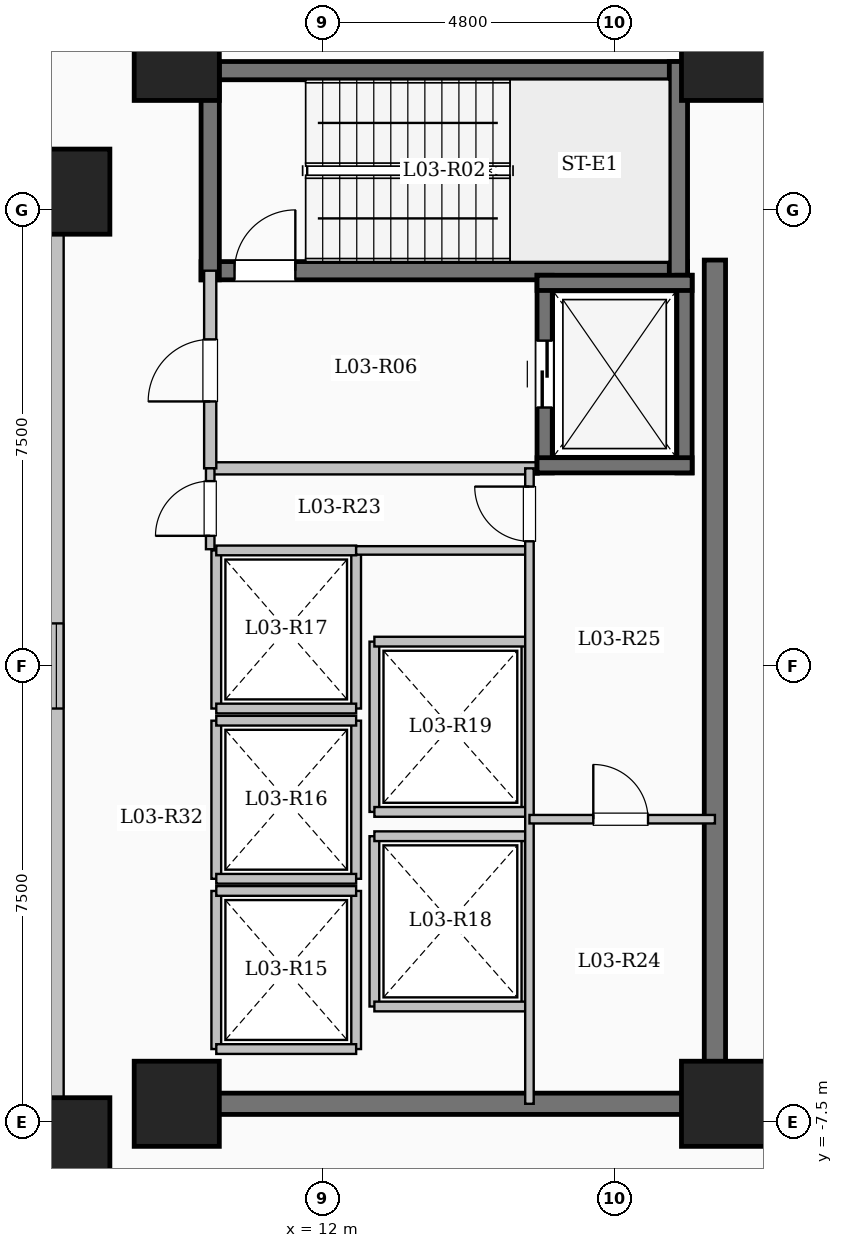
"""IFC4 building model, lengths in metres.
Left out: names, types, materials, properties, quantities, classifications, styles, units other than length and angle.
Written with IfcOpenShell. Run it as: python <this file> out.ifc"""

import sys

from ifc_helpers import new_model, si_unit, direction, frame, frame_2d, origin, origin_2d, place, context, subcontext, project, spatial, rectangle, extrude, element, fill, save


model = new_model("IFC4")
c1 = context("Model", 3, precision=1e-05, world=origin(), true_north=direction((0.0, 1.0)))
c2 = subcontext(c1, "Body", "Model", "MODEL_VIEW")
j1 = project(units=[si_unit("LENGTHUNIT", "METRE"), si_unit("PLANEANGLEUNIT", "RADIAN")], contexts=[c1])
p1 = place(None, origin())
s1 = spatial("IfcSite", under=j1, at=p1, CompositionType="ELEMENT")
p2 = place(p1, origin())
s2 = spatial("IfcBuilding", under=s1, at=p2, CompositionType="ELEMENT")
p3 = place(p2, frame((0.0, 0.0, 14.4)))
s3 = spatial("IfcBuildingStorey", under=s2, at=p3, CompositionType="ELEMENT", Elevation=14.4)
for number, where, z_axis, x_axis in (
    (1, (7.8, -7.8, 0.0), (0.0, 0.0, 1.0), (1.0, 0.0, 0.0)),
    (2, (7.8, 7.8, 0.0), (0.0, 0.0, 1.0), (1.0, 0.0, 0.0)),
    (3, (9.6, -7.2, 0.0), (0.0, 0.0, 1.0), (1.0, 0.0, 0.0)),
    (4, (9.6, 10.0, 0.0), (0.0, 0.0, 1.0), (1.0, 0.0, 0.0)),
    (5, (18.6, -7.2, 0.0), (0.0, 0.0, 1.0), (1.0, 0.0, 0.0)),
    (6, (18.6, 10.0, 0.0), (0.0, 0.0, 1.0), (1.0, 0.0, 0.0)),
):
    element("IfcColumn", number, at=place(p3, frame(where, z_axis=z_axis, x_axis=x_axis)), inside=s3, PredefinedType="COLUMN", context=c2, shape_type="SweptSolid", body=[
        extrude(rectangle(XDim=1.4, YDim=1.4, at=origin_2d()), origin(), (0.0, 0.0, 1.0), 4.5),
    ])
p4 = place(p3, frame((-7.62, -7.62, 0.0), z_axis=(0.0, 0.0, 1.0), x_axis=(1.0, 0.0, 0.0)))
e7 = element("IfcWall", 7, at=p4, inside=s3, PredefinedType="SOLIDWALL", context=c2, shape_type="SweptSolid", body=[
    extrude(rectangle(XDim=15.24, YDim=0.24, at=frame_2d((7.62, 0.0))), origin(), (0.0, 0.0, 1.0), 4.2),
])
p5 = place(p4, frame((6.92, 0.0, 0.95)))
e8 = element("IfcOpeningElement", 8, at=p5, cuts=e7, PredefinedType="OPENING", context=c2, shape_type="SweptSolid", body=[
    extrude(rectangle(XDim=1.4, YDim=1.5, at=frame_2d((0.7, 0.75))), frame((0.0, 0.13, 0.0), z_axis=(0.0, -1.0, 0.0), x_axis=(1.0, 0.0, 0.0)), (0.0, 0.0, 1.0), 0.26),
])
p6 = place(p3, frame((7.62, -7.62, 0.0), z_axis=(0.0, 0.0, 1.0), x_axis=(0.0, 1.0, 0.0)))
e9 = element("IfcWall", 9, at=p6, inside=s3, PredefinedType="SOLIDWALL", context=c2, shape_type="SweptSolid", body=[
    extrude(rectangle(XDim=15.24, YDim=0.24, at=frame_2d((7.62, 0.0))), origin(), (0.0, 0.0, 1.0), 4.2),
])
p7 = place(p6, frame((6.92, 0.0, 0.95)))
e10 = element("IfcOpeningElement", 10, at=p7, cuts=e9, PredefinedType="OPENING", context=c2, shape_type="SweptSolid", body=[
    extrude(rectangle(XDim=1.4, YDim=1.5, at=frame_2d((0.7, 0.75))), frame((0.0, 0.13, 0.0), z_axis=(0.0, -1.0, 0.0), x_axis=(1.0, 0.0, 0.0)), (0.0, 0.0, 1.0), 0.26),
])
p8 = place(p3, frame((7.62, 7.62, 0.0), z_axis=(0.0, 0.0, 1.0), x_axis=(-1.0, 0.0, 0.0)))
e11 = element("IfcWall", 11, at=p8, inside=s3, PredefinedType="SOLIDWALL", context=c2, shape_type="SweptSolid", body=[
    extrude(rectangle(XDim=15.24, YDim=0.24, at=frame_2d((7.62, 0.0))), origin(), (0.0, 0.0, 1.0), 4.2),
])
p9 = place(p8, frame((6.92, 0.0, 0.95)))
e12 = element("IfcOpeningElement", 12, at=p9, cuts=e11, PredefinedType="OPENING", context=c2, shape_type="SweptSolid", body=[
    extrude(rectangle(XDim=1.4, YDim=1.5, at=frame_2d((0.7, 0.75))), frame((0.0, 0.13, 0.0), z_axis=(0.0, -1.0, 0.0), x_axis=(1.0, 0.0, 0.0)), (0.0, 0.0, 1.0), 0.26),
])
p10 = place(p3, frame((10.0, 9.79, 0.0), z_axis=(0.0, 0.0, 1.0), x_axis=(1.0, 0.0, 0.0)))
e13 = element("IfcWall", 13, at=p10, inside=s3, PredefinedType="SHEAR", context=c2, shape_type="SweptSolid", body=[
    extrude(rectangle(XDim=8.0, YDim=0.3, at=frame_2d((4.0, 0.0))), origin(), (0.0, 0.0, 1.0), 4.5),
])
p11 = place(p3, frame((10.0, 6.5, 0.0), z_axis=(0.0, 0.0, 1.0), x_axis=(1.0, 0.0, 0.0)))
e14 = element("IfcWall", 14, at=p11, inside=s3, PredefinedType="SHEAR", context=c2, shape_type="SweptSolid", body=[
    extrude(rectangle(XDim=8.0, YDim=0.3, at=frame_2d((4.0, 0.0))), origin(), (0.0, 0.0, 1.0), 4.5),
])
p12 = place(p11, frame((0.55, 0.0, 0.0)))
e15 = element("IfcOpeningElement", 15, at=p12, cuts=e14, PredefinedType="OPENING", context=c2, shape_type="SweptSolid", body=[
    extrude(rectangle(XDim=1.0, YDim=2.15, at=frame_2d((0.5, 1.075))), frame((0.0, 0.16, 0.0), z_axis=(0.0, -1.0, 0.0), x_axis=(1.0, 0.0, 0.0)), (0.0, 0.0, 1.0), 0.32),
])
for number, where, z_axis, x_axis in (
    (16, (10.15, 6.35, 0.0), (0.0, 0.0, 1.0), (0.0, 1.0, 0.0)),
    (17, (17.85, 6.35, 0.0), (0.0, 0.0, 1.0), (0.0, 1.0, 0.0)),
):
    element("IfcWall", number, at=place(p3, frame(where, z_axis=z_axis, x_axis=x_axis)), inside=s3, PredefinedType="SHEAR", context=c2, shape_type="SweptSolid", body=[
        extrude(rectangle(XDim=3.59, YDim=0.3, at=frame_2d((1.795, 0.0))), origin(), (0.0, 0.0, 1.0), 4.5),
    ])
p13 = place(p3, frame((10.15, 3.25, 0.0), z_axis=(0.0, 0.0, 1.0), x_axis=(1.0, 0.0, 0.0)))
e18 = element("IfcWall", 18, at=p13, inside=s3, PredefinedType="SOLIDWALL", context=c2, shape_type="SweptSolid", body=[
    extrude(rectangle(XDim=5.4, YDim=0.2, at=frame_2d((2.7, 0.0))), origin(), (0.0, 0.0, 1.0), 4.2),
])
p14 = place(p3, frame((10.15, 3.25, 0.0), z_axis=(0.0, 0.0, 1.0), x_axis=(0.0, 1.0, 0.0)))
e19 = element("IfcWall", 19, at=p14, inside=s3, PredefinedType="SOLIDWALL", context=c2, shape_type="SweptSolid", body=[
    extrude(rectangle(XDim=3.25, YDim=0.2, at=frame_2d((1.625, 0.0))), origin(), (0.0, 0.0, 1.0), 4.2),
])
p15 = place(p14, frame((1.1, 0.0, 0.0)))
e20 = element("IfcOpeningElement", 20, at=p15, cuts=e19, PredefinedType="OPENING", context=c2, shape_type="SweptSolid", body=[
    extrude(rectangle(XDim=1.02, YDim=2.15, at=frame_2d((0.51, 1.075))), frame((0.0, 0.11, 0.0), z_axis=(0.0, -1.0, 0.0), x_axis=(1.0, 0.0, 0.0)), (0.0, 0.0, 1.0), 0.22),
])
p16 = place(p3, frame((15.65, 3.175, 0.0), z_axis=(0.0, 0.0, 1.0), x_axis=(0.0, 1.0, 0.0)))
e21 = element("IfcWall", 21, at=p16, inside=s3, PredefinedType="SHEAR", context=c2, shape_type="SweptSolid", body=[
    extrude(rectangle(XDim=3.25, YDim=0.25, at=frame_2d((1.625, 0.0))), origin(), (0.0, 0.0, 1.0), 4.5),
])
p17 = place(p16, frame((1.075, 0.0, 0.0)))
e22 = element("IfcOpeningElement", 22, at=p17, cuts=e21, PredefinedType="OPENING", context=c2, shape_type="SweptSolid", body=[
    extrude(rectangle(XDim=1.1, YDim=2.15, at=frame_2d((0.55, 1.075))), frame((0.0, 0.135, 0.0), z_axis=(0.0, -1.0, 0.0), x_axis=(1.0, 0.0, 0.0)), (0.0, 0.0, 1.0), 0.27),
])
p18 = place(p3, frame((17.95, 3.175, 0.0), z_axis=(0.0, 0.0, 1.0), x_axis=(0.0, 1.0, 0.0)))
e23 = element("IfcWall", 23, at=p18, inside=s3, PredefinedType="SHEAR", context=c2, shape_type="SweptSolid", body=[
    extrude(rectangle(XDim=3.25, YDim=0.25, at=frame_2d((1.625, 0.0))), origin(), (0.0, 0.0, 1.0), 4.5),
])
for number, where, z_axis, x_axis in (
    (24, (15.525, 3.3, 0.0), (0.0, 0.0, 1.0), (1.0, 0.0, 0.0)),
    (25, (15.525, 6.3, 0.0), (0.0, 0.0, 1.0), (1.0, 0.0, 0.0)),
):
    element("IfcWall", number, at=place(p3, frame(where, z_axis=z_axis, x_axis=x_axis)), inside=s3, PredefinedType="SHEAR", context=c2, shape_type="SweptSolid", body=[
        extrude(rectangle(XDim=2.55, YDim=0.25, at=frame_2d((1.275, 0.0))), origin(), (0.0, 0.0, 1.0), 4.5),
    ])
for number, where, z_axis, x_axis in (
    (26, (10.25, -6.3, 0.0), (0.0, 0.0, 1.0), (0.0, 1.0, 0.0)),
    (27, (12.55, -6.3, 0.0), (0.0, 0.0, 1.0), (0.0, 1.0, 0.0)),
):
    element("IfcWall", number, at=place(p3, frame(where, z_axis=z_axis, x_axis=x_axis)), inside=s3, PredefinedType="SOLIDWALL", context=c2, shape_type="SweptSolid", body=[
        extrude(rectangle(XDim=2.6, YDim=0.16, at=frame_2d((1.3, 0.0))), origin(), (0.0, 0.0, 1.0), 4.2),
    ])
for number, where, z_axis, x_axis in (
    (28, (10.25, -6.3, 0.0), (0.0, 0.0, 1.0), (1.0, 0.0, 0.0)),
    (29, (10.25, -3.7, 0.0), (0.0, 0.0, 1.0), (1.0, 0.0, 0.0)),
):
    element("IfcWall", number, at=place(p3, frame(where, z_axis=z_axis, x_axis=x_axis)), inside=s3, PredefinedType="SOLIDWALL", context=c2, shape_type="SweptSolid", body=[
        extrude(rectangle(XDim=2.3, YDim=0.16, at=frame_2d((1.15, 0.0))), origin(), (0.0, 0.0, 1.0), 4.2),
    ])
for number, where, z_axis, x_axis in (
    (30, (10.25, -3.5, 0.0), (0.0, 0.0, 1.0), (0.0, 1.0, 0.0)),
    (31, (12.55, -3.5, 0.0), (0.0, 0.0, 1.0), (0.0, 1.0, 0.0)),
):
    element("IfcWall", number, at=place(p3, frame(where, z_axis=z_axis, x_axis=x_axis)), inside=s3, PredefinedType="SOLIDWALL", context=c2, shape_type="SweptSolid", body=[
        extrude(rectangle(XDim=2.6, YDim=0.16, at=frame_2d((1.3, 0.0))), origin(), (0.0, 0.0, 1.0), 4.2),
    ])
for number, where, z_axis, x_axis in (
    (32, (10.25, -3.5, 0.0), (0.0, 0.0, 1.0), (1.0, 0.0, 0.0)),
    (33, (10.25, -0.9, 0.0), (0.0, 0.0, 1.0), (1.0, 0.0, 0.0)),
):
    element("IfcWall", number, at=place(p3, frame(where, z_axis=z_axis, x_axis=x_axis)), inside=s3, PredefinedType="SOLIDWALL", context=c2, shape_type="SweptSolid", body=[
        extrude(rectangle(XDim=2.3, YDim=0.16, at=frame_2d((1.15, 0.0))), origin(), (0.0, 0.0, 1.0), 4.2),
    ])
for number, where, z_axis, x_axis in (
    (34, (10.25, -0.7, 0.0), (0.0, 0.0, 1.0), (0.0, 1.0, 0.0)),
    (35, (12.55, -0.7, 0.0), (0.0, 0.0, 1.0), (0.0, 1.0, 0.0)),
):
    element("IfcWall", number, at=place(p3, frame(where, z_axis=z_axis, x_axis=x_axis)), inside=s3, PredefinedType="SOLIDWALL", context=c2, shape_type="SweptSolid", body=[
        extrude(rectangle(XDim=2.6, YDim=0.16, at=frame_2d((1.3, 0.0))), origin(), (0.0, 0.0, 1.0), 4.2),
    ])
for number, where, z_axis, x_axis in (
    (36, (10.25, -0.7, 0.0), (0.0, 0.0, 1.0), (1.0, 0.0, 0.0)),
    (37, (10.25, 1.9, 0.0), (0.0, 0.0, 1.0), (1.0, 0.0, 0.0)),
):
    element("IfcWall", number, at=place(p3, frame(where, z_axis=z_axis, x_axis=x_axis)), inside=s3, PredefinedType="SOLIDWALL", context=c2, shape_type="SweptSolid", body=[
        extrude(rectangle(XDim=2.3, YDim=0.16, at=frame_2d((1.15, 0.0))), origin(), (0.0, 0.0, 1.0), 4.2),
    ])
for number, where, z_axis, x_axis in (
    (38, (12.85, -5.6, 0.0), (0.0, 0.0, 1.0), (0.0, 1.0, 0.0)),
    (39, (15.35, -5.6, 0.0), (0.0, 0.0, 1.0), (0.0, 1.0, 0.0)),
):
    element("IfcWall", number, at=place(p3, frame(where, z_axis=z_axis, x_axis=x_axis)), inside=s3, PredefinedType="SOLIDWALL", context=c2, shape_type="SweptSolid", body=[
        extrude(rectangle(XDim=2.8, YDim=0.16, at=frame_2d((1.4, 0.0))), origin(), (0.0, 0.0, 1.0), 4.2),
    ])
for number, where, z_axis, x_axis in (
    (40, (12.85, -5.6, 0.0), (0.0, 0.0, 1.0), (1.0, 0.0, 0.0)),
    (41, (12.85, -2.8, 0.0), (0.0, 0.0, 1.0), (1.0, 0.0, 0.0)),
):
    element("IfcWall", number, at=place(p3, frame(where, z_axis=z_axis, x_axis=x_axis)), inside=s3, PredefinedType="SOLIDWALL", context=c2, shape_type="SweptSolid", body=[
        extrude(rectangle(XDim=2.5, YDim=0.16, at=frame_2d((1.25, 0.0))), origin(), (0.0, 0.0, 1.0), 4.2),
    ])
for number, where, z_axis, x_axis in (
    (42, (12.85, -2.4, 0.0), (0.0, 0.0, 1.0), (0.0, 1.0, 0.0)),
    (43, (15.35, -2.4, 0.0), (0.0, 0.0, 1.0), (0.0, 1.0, 0.0)),
):
    element("IfcWall", number, at=place(p3, frame(where, z_axis=z_axis, x_axis=x_axis)), inside=s3, PredefinedType="SOLIDWALL", context=c2, shape_type="SweptSolid", body=[
        extrude(rectangle(XDim=2.8, YDim=0.16, at=frame_2d((1.4, 0.0))), origin(), (0.0, 0.0, 1.0), 4.2),
    ])
for number, where, z_axis, x_axis in (
    (44, (12.85, -2.4, 0.0), (0.0, 0.0, 1.0), (1.0, 0.0, 0.0)),
    (45, (12.85, 0.4, 0.0), (0.0, 0.0, 1.0), (1.0, 0.0, 0.0)),
):
    element("IfcWall", number, at=place(p3, frame(where, z_axis=z_axis, x_axis=x_axis)), inside=s3, PredefinedType="SOLIDWALL", context=c2, shape_type="SweptSolid", body=[
        extrude(rectangle(XDim=2.5, YDim=0.16, at=frame_2d((1.25, 0.0))), origin(), (0.0, 0.0, 1.0), 4.2),
    ])
p19 = place(p3, frame((18.45, -7.375, 0.0), z_axis=(0.0, 0.0, 1.0), x_axis=(0.0, 1.0, 0.0)))
e46 = element("IfcWall", 46, at=p19, inside=s3, PredefinedType="SHEAR", context=c2, shape_type="SweptSolid", body=[
    extrude(rectangle(XDim=14.05, YDim=0.35, at=frame_2d((7.025, 0.0))), origin(), (0.0, 0.0, 1.0), 4.5),
])
p20 = place(p3, frame((10.075, -7.2, 0.0), z_axis=(0.0, 0.0, 1.0), x_axis=(1.0, 0.0, 0.0)))
e47 = element("IfcWall", 47, at=p20, inside=s3, PredefinedType="SHEAR", context=c2, shape_type="SweptSolid", body=[
    extrude(rectangle(XDim=8.55, YDim=0.35, at=frame_2d((4.275, 0.0))), origin(), (0.0, 0.0, 1.0), 4.5),
])
p21 = place(p3, frame((12.55, 1.9, 0.0), z_axis=(0.0, 0.0, 1.0), x_axis=(1.0, 0.0, 0.0)))
e48 = element("IfcWall", 48, at=p21, inside=s3, PredefinedType="PARTITIONING", context=c2, shape_type="SweptSolid", body=[
    extrude(rectangle(XDim=2.85, YDim=0.14, at=frame_2d((1.425, 0.0))), origin(), (0.0, 0.0, 1.0), 4.2),
])
p22 = place(p3, frame((10.15, 1.92, 0.0), z_axis=(0.0, 0.0, 1.0), x_axis=(0.0, 1.0, 0.0)))
e49 = element("IfcWall", 49, at=p22, inside=s3, PredefinedType="PARTITIONING", context=c2, shape_type="SweptSolid", body=[
    extrude(rectangle(XDim=1.33, YDim=0.14, at=frame_2d((0.665, 0.0))), origin(), (0.0, 0.0, 1.0), 4.2),
])
p23 = place(p22, frame((0.22, 0.0, 0.0)))
e50 = element("IfcOpeningElement", 50, at=p23, cuts=e49, PredefinedType="OPENING", context=c2, shape_type="SweptSolid", body=[
    extrude(rectangle(XDim=0.9, YDim=2.08, at=frame_2d((0.45, 1.04))), frame((0.0, 0.08, 0.0), z_axis=(0.0, -1.0, 0.0), x_axis=(1.0, 0.0, 0.0)), (0.0, 0.0, 1.0), 0.16),
])
p24 = place(p3, frame((15.4, -7.2, 0.0), z_axis=(0.0, 0.0, 1.0), x_axis=(0.0, 1.0, 0.0)))
e51 = element("IfcWall", 51, at=p24, inside=s3, PredefinedType="PARTITIONING", context=c2, shape_type="SweptSolid", body=[
    extrude(rectangle(XDim=10.45, YDim=0.14, at=frame_2d((5.225, 0.0))), origin(), (0.0, 0.0, 1.0), 4.2),
])
p25 = place(p24, frame((9.25, 0.0, 0.0)))
e52 = element("IfcOpeningElement", 52, at=p25, cuts=e51, PredefinedType="OPENING", context=c2, shape_type="SweptSolid", body=[
    extrude(rectangle(XDim=0.9, YDim=2.08, at=frame_2d((0.45, 1.04))), frame((0.0, 0.08, 0.0), z_axis=(0.0, -1.0, 0.0), x_axis=(1.0, 0.0, 0.0)), (0.0, 0.0, 1.0), 0.16),
])
p26 = place(p3, frame((15.4, -2.52, 0.0), z_axis=(0.0, 0.0, 1.0), x_axis=(1.0, 0.0, 0.0)))
e53 = element("IfcWall", 53, at=p26, inside=s3, PredefinedType="PARTITIONING", context=c2, shape_type="SweptSolid", body=[
    extrude(rectangle(XDim=3.05, YDim=0.14, at=frame_2d((1.525, 0.0))), origin(), (0.0, 0.0, 1.0), 4.2),
])
p27 = place(p26, frame((1.05, 0.0, 0.0)))
e54 = element("IfcOpeningElement", 54, at=p27, cuts=e53, PredefinedType="OPENING", context=c2, shape_type="SweptSolid", body=[
    extrude(rectangle(XDim=0.9, YDim=2.08, at=frame_2d((0.45, 1.04))), frame((0.0, 0.08, 0.0), z_axis=(0.0, -1.0, 0.0), x_axis=(1.0, 0.0, 0.0)), (0.0, 0.0, 1.0), 0.16),
])
p28 = place(p7, origin())
e55 = element("IfcWindow", 55, at=p28, inside=s3, PartitioningType="SINGLE_PANEL", PredefinedType="WINDOW", context=c2, shape_type="SweptSolid", body=[
    extrude(rectangle(XDim=1.4, YDim=1.5, at=frame_2d((0.7, 0.75))), frame((0.0, 0.03, 0.0), z_axis=(0.0, -1.0, 0.0), x_axis=(1.0, 0.0, 0.0)), (0.0, 0.0, 1.0), 0.06),
])
fill(e10, e55)
p29 = place(p12, origin())
e56 = element("IfcDoor", 56, at=p29, inside=s3, OperationType="SINGLE_SWING_RIGHT", PredefinedType="DOOR", context=c2, shape_type="SweptSolid", body=[
    extrude(rectangle(XDim=1.0, YDim=2.15, at=frame_2d((0.5, 1.075))), frame((0.0, 0.025, 0.0), z_axis=(0.0, -1.0, 0.0), x_axis=(1.0, 0.0, 0.0)), (0.0, 0.0, 1.0), 0.05),
])
fill(e15, e56)
p30 = place(p15, origin())
e57 = element("IfcDoor", 57, at=p30, inside=s3, OperationType="SINGLE_SWING_LEFT", PredefinedType="DOOR", context=c2, shape_type="SweptSolid", body=[
    extrude(rectangle(XDim=1.02, YDim=2.15, at=frame_2d((0.51, 1.075))), frame((0.0, 0.025, 0.0), z_axis=(0.0, -1.0, 0.0), x_axis=(1.0, 0.0, 0.0)), (0.0, 0.0, 1.0), 0.05),
])
fill(e20, e57)
p31 = place(p17, origin())
e58 = element("IfcDoor", 58, at=p31, inside=s3, OperationType="SLIDING_TO_LEFT", PredefinedType="DOOR", context=c2, shape_type="SweptSolid", body=[
    extrude(rectangle(XDim=1.1, YDim=2.15, at=frame_2d((0.55, 1.075))), frame((0.0, 0.025, 0.0), z_axis=(0.0, -1.0, 0.0), x_axis=(1.0, 0.0, 0.0)), (0.0, 0.0, 1.0), 0.05),
])
fill(e22, e58)
p32 = place(p23, origin())
e59 = element("IfcDoor", 59, at=p32, inside=s3, OperationType="SINGLE_SWING_LEFT", PredefinedType="DOOR", context=c2, shape_type="SweptSolid", body=[
    extrude(rectangle(XDim=0.9, YDim=2.08, at=frame_2d((0.45, 1.04))), frame((0.0, 0.025, 0.0), z_axis=(0.0, -1.0, 0.0), x_axis=(1.0, 0.0, 0.0)), (0.0, 0.0, 1.0), 0.05),
])
fill(e50, e59)
p33 = place(p25, origin())
e60 = element("IfcDoor", 60, at=p33, inside=s3, OperationType="SINGLE_SWING_RIGHT", PredefinedType="DOOR", context=c2, shape_type="SweptSolid", body=[
    extrude(rectangle(XDim=0.9, YDim=2.08, at=frame_2d((0.45, 1.04))), frame((0.0, 0.025, 0.0), z_axis=(0.0, -1.0, 0.0), x_axis=(1.0, 0.0, 0.0)), (0.0, 0.0, 1.0), 0.05),
])
fill(e52, e60)
p34 = place(p27, origin())
e61 = element("IfcDoor", 61, at=p34, inside=s3, OperationType="SINGLE_SWING_LEFT", PredefinedType="DOOR", context=c2, shape_type="SweptSolid", body=[
    extrude(rectangle(XDim=0.9, YDim=2.08, at=frame_2d((0.45, 1.04))), frame((0.0, 0.025, 0.0), z_axis=(0.0, -1.0, 0.0), x_axis=(1.0, 0.0, 0.0)), (0.0, 0.0, 1.0), 0.05),
])
fill(e54, e61)
save(model, sys.argv[1])
